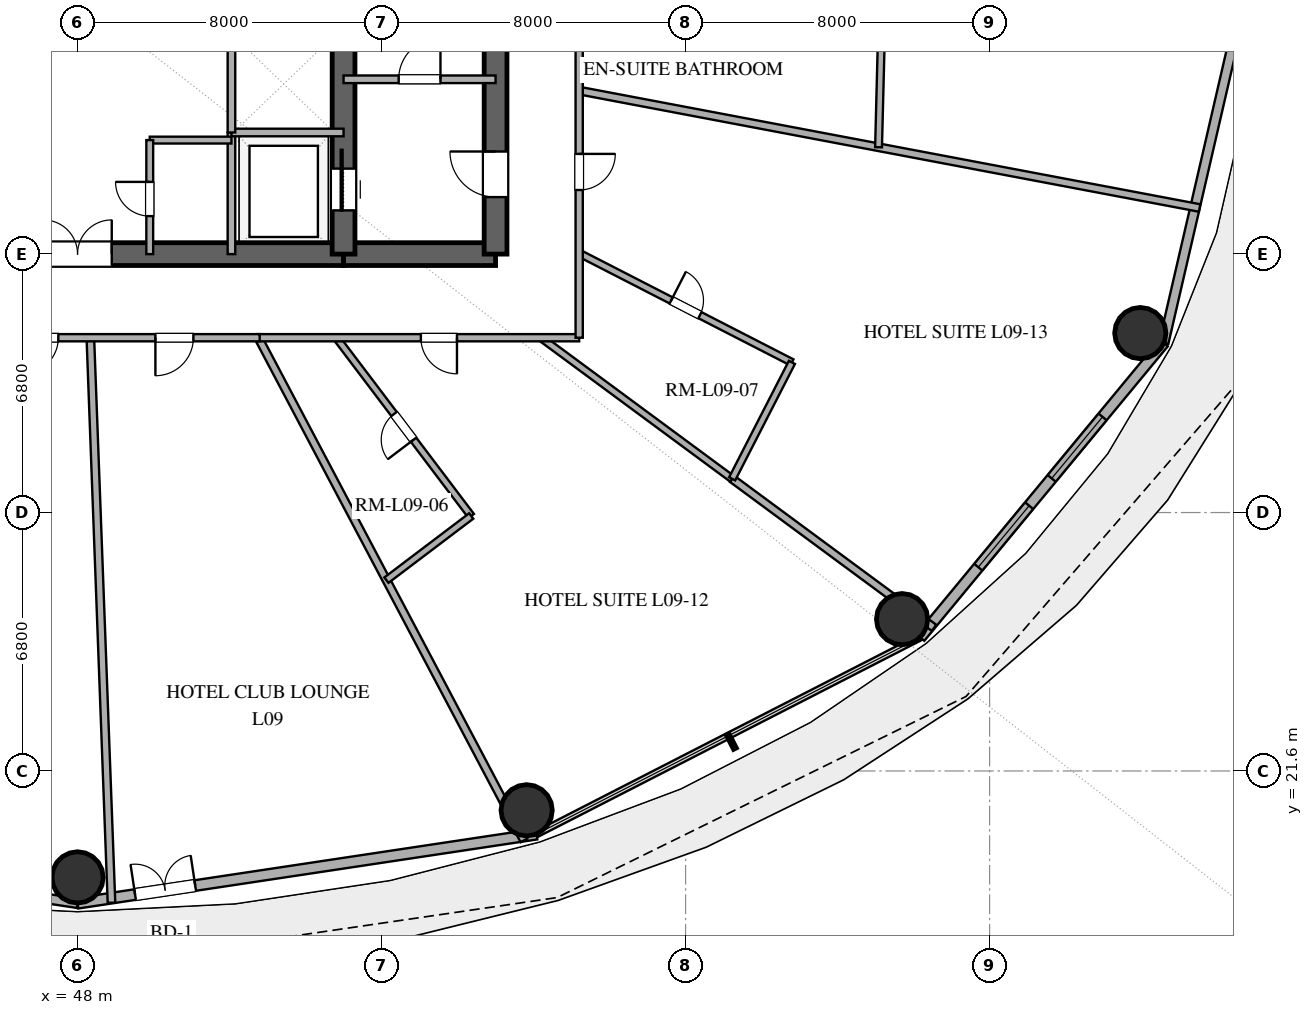
"""IFC4 building model, lengths in metres.
Left out: names, types, materials, properties, quantities, classifications, styles, units other than length and angle.
Written with IfcOpenShell. Run it as: python <this file> out.ifc"""

import sys

from ifc_helpers import new_model, si_unit, direction, frame, frame_2d, origin, origin_2d, place, context, subcontext, project, spatial, rectangle, hollow_circle, extrude, element, fill, save


model = new_model("IFC4")
c1 = context("Model", 3, precision=1e-05, world=origin(), true_north=direction((0.0, 1.0)))
c2 = subcontext(c1, "Body", "Model", "MODEL_VIEW")
j1 = project(units=[si_unit("LENGTHUNIT", "METRE"), si_unit("PLANEANGLEUNIT", "RADIAN")], contexts=[c1])
p1 = place(None, origin())
s1 = spatial("IfcSite", under=j1, at=p1, CompositionType="ELEMENT")
p2 = place(p1, origin())
s2 = spatial("IfcBuilding", under=s1, at=p2, CompositionType="ELEMENT")
p3 = place(p2, frame((0.0, 0.0, 42.6)))
s3 = spatial("IfcBuildingStorey", under=s2, at=p3, CompositionType="ELEMENT", Elevation=42.6)
p4 = place(p3, frame((41.0, 35.2, 0.0), z_axis=(0.0, 0.0, 1.0), x_axis=(1.0, 0.0, 0.0)))
e1 = element("IfcWall", 1, at=p4, inside=s3, PredefinedType="SHEAR", context=c2, shape_type="SweptSolid", body=[
    extrude(rectangle(XDim=14.0, YDim=0.6, at=frame_2d((7.0, 0.0))), origin(), (0.0, 0.0, 1.0), 3.38),
])
p5 = place(p4, frame((6.1, 0.0, 0.0)))
e2 = element("IfcOpeningElement", 2, at=p5, cuts=e1, PredefinedType="OPENING", context=c2, shape_type="SweptSolid", body=[
    extrude(rectangle(XDim=1.8, YDim=2.25, at=frame_2d((0.9, 1.125))), frame((0.0, 0.31, 0.0), z_axis=(0.0, -1.0, 0.0), x_axis=(1.0, 0.0, 0.0)), (0.0, 0.0, 1.0), 0.62),
])
p6 = place(p3, frame((55.0, 35.2, 0.0), z_axis=(0.0, 0.0, 1.0), x_axis=(1.0, 0.0, 0.0)))
e3 = element("IfcWall", 3, at=p6, inside=s3, PredefinedType="SHEAR", context=c2, shape_type="SweptSolid", body=[
    extrude(rectangle(XDim=4.0, YDim=0.6, at=frame_2d((2.0, 0.0))), origin(), (0.0, 0.0, 1.0), 3.38),
])
p7 = place(p3, frame((59.0, 35.2, 0.0), z_axis=(0.0, 0.0, 1.0), x_axis=(0.0, 1.0, 0.0)))
e4 = element("IfcWall", 4, at=p7, inside=s3, PredefinedType="SHEAR", context=c2, shape_type="SweptSolid", body=[
    extrude(rectangle(XDim=13.6, YDim=0.6, at=frame_2d((6.8, 0.0))), origin(), (0.0, 0.0, 1.0), 3.38),
])
p8 = place(p7, frame((1.5, 0.0, 0.0)))
e5 = element("IfcOpeningElement", 5, at=p8, cuts=e4, PredefinedType="OPENING", context=c2, shape_type="SweptSolid", body=[
    extrude(rectangle(XDim=1.2, YDim=2.15, at=frame_2d((0.6, 1.075))), frame((0.0, 0.31, 0.0), z_axis=(0.0, -1.0, 0.0), x_axis=(1.0, 0.0, 0.0)), (0.0, 0.0, 1.0), 0.62),
])
p9 = place(p3, frame((55.0, 35.2, 0.0), z_axis=(0.0, 0.0, 1.0), x_axis=(0.0, 1.0, 0.0)))
e6 = element("IfcWall", 6, at=p9, inside=s3, PredefinedType="SHEAR", context=c2, shape_type="SweptSolid", body=[
    extrude(rectangle(XDim=13.6, YDim=0.6, at=frame_2d((6.8, 0.0))), origin(), (0.0, 0.0, 1.0), 3.38),
])
p10 = place(p9, frame((1.15, 0.0, 0.0)))
e7 = element("IfcOpeningElement", 7, at=p10, cuts=e6, PredefinedType="OPENING", context=c2, shape_type="SweptSolid", body=[
    extrude(rectangle(XDim=1.1, YDim=2.2, at=frame_2d((0.55, 1.1))), frame((0.0, 0.31, 0.0), z_axis=(0.0, -1.0, 0.0), x_axis=(1.0, 0.0, 0.0)), (0.0, 0.0, 1.0), 0.62),
])
for number, where, z_axis, x_axis in (
    (8, (48.0, 18.8, 0.0), (0.0, 0.0, 1.0), (1.0, 0.0, 0.0)),
    (9, (59.818, 20.566, 0.0), (0.0, 0.0, 1.0), (1.0, 0.0, 0.0)),
    (10, (69.697, 25.595, 0.0), (0.0, 0.0, 1.0), (1.0, 0.0, 0.0)),
    (11, (75.966, 33.122, 0.0), (0.0, 0.0, 1.0), (1.0, 0.0, 0.0)),
):
    element("IfcColumn", number, at=place(p3, frame(where, z_axis=z_axis, x_axis=x_axis)), inside=s3, PredefinedType="COLUMN", context=c2, shape_type="SweptSolid", body=[
        extrude(hollow_circle(Radius=0.675, WallThickness=0.036, at=origin_2d()), origin(), (0.0, 0.0, 1.0), 3.38),
    ])
p11 = place(p3, frame((35.922, 19.938, 0.0), z_axis=(0.0, 0.0, 1.0), x_axis=(0.988864835849, -0.148816452121, 0.0)))
e12 = element("IfcWall", 12, at=p11, inside=s3, PredefinedType="SOLIDWALL", context=c2, shape_type="SweptSolid", body=[
    extrude(rectangle(XDim=12.214, YDim=0.25, at=frame_2d((6.107, 0.0))), origin(), (0.0, 0.0, 1.0), 3.38),
])
p12 = place(p11, frame((8.134, 0.0, 1.42)))
e13 = element("IfcOpeningElement", 13, at=p12, cuts=e12, PredefinedType="OPENING", context=c2, shape_type="SweptSolid", body=[
    extrude(rectangle(XDim=1.0, YDim=1.05, at=frame_2d((0.5, 0.525))), frame((0.0, 0.135, 0.0), z_axis=(0.0, -1.0, 0.0), x_axis=(1.0, 0.0, 0.0)), (0.0, 0.0, 1.0), 0.27),
])
p13 = place(p3, frame((48.0, 18.12, 0.0), z_axis=(0.0, 0.0, 1.0), x_axis=(0.988864835849, 0.148816452121, 0.0)))
e14 = element("IfcWall", 14, at=p13, inside=s3, PredefinedType="SOLIDWALL", context=c2, shape_type="SweptSolid", body=[
    extrude(rectangle(XDim=12.214, YDim=0.28, at=frame_2d((6.107, 0.0))), origin(), (0.0, 0.0, 1.0), 3.38),
])
p14 = place(p13, frame((1.531, 0.0, 0.0)))
e15 = element("IfcOpeningElement", 15, at=p14, cuts=e14, PredefinedType="OPENING", context=c2, shape_type="SweptSolid", body=[
    extrude(rectangle(XDim=1.6, YDim=2.25, at=frame_2d((0.8, 1.125))), frame((0.0, 0.15, 0.0), z_axis=(0.0, -1.0, 0.0), x_axis=(1.0, 0.0, 0.0)), (0.0, 0.0, 1.0), 0.3),
])
p15 = place(p3, frame((70.174, 25.114, 0.0), z_axis=(0.0, 0.0, 1.0), x_axis=(0.637296809613, 0.770618437657, 0.0)))
e16 = element("IfcWall", 16, at=p15, inside=s3, PredefinedType="SOLIDWALL", context=c2, shape_type="SweptSolid", body=[
    extrude(rectangle(XDim=10.053, YDim=0.28, at=frame_2d((5.027, 0.0))), origin(), (0.0, 0.0, 1.0), 3.38),
])
p16 = place(p15, frame((2.398, 0.0, 0.85)))
e17 = element("IfcOpeningElement", 17, at=p16, cuts=e16, PredefinedType="OPENING", context=c2, shape_type="SweptSolid", body=[
    extrude(rectangle(XDim=2.1, YDim=2.2, at=frame_2d((1.05, 1.1))), frame((0.0, 0.15, 0.0), z_axis=(0.0, -1.0, 0.0), x_axis=(1.0, 0.0, 0.0)), (0.0, 0.0, 1.0), 0.3),
])
p17 = place(p15, frame((5.43, 0.0, 0.85)))
e18 = element("IfcOpeningElement", 18, at=p17, cuts=e16, PredefinedType="OPENING", context=c2, shape_type="SweptSolid", body=[
    extrude(rectangle(XDim=2.1, YDim=2.2, at=frame_2d((1.05, 1.1))), frame((0.0, 0.15, 0.0), z_axis=(0.0, -1.0, 0.0), x_axis=(1.0, 0.0, 0.0)), (0.0, 0.0, 1.0), 0.3),
])
p18 = place(p3, frame((76.581, 32.862, 0.0), z_axis=(0.0, 0.0, 1.0), x_axis=(0.225454452941, 0.974253709076, 0.0)))
e19 = element("IfcWall", 19, at=p18, inside=s3, PredefinedType="SOLIDWALL", context=c2, shape_type="SweptSolid", body=[
    extrude(rectangle(XDim=9.38, YDim=0.25, at=frame_2d((4.69, 0.0))), origin(), (0.0, 0.0, 1.0), 3.38),
])
p19 = place(p3, frame((55.0, 39.8, 0.0), z_axis=(0.0, 0.0, 1.0), x_axis=(1.0, 0.0, 0.0)))
e20 = element("IfcWall", 20, at=p19, inside=s3, PredefinedType="SOLIDWALL", context=c2, shape_type="SweptSolid", body=[
    extrude(rectangle(XDim=4.0, YDim=0.2, at=frame_2d((2.0, 0.0))), origin(), (0.0, 0.0, 1.0), 2.74),
])
p20 = place(p19, frame((1.45, 0.0, 0.0)))
e21 = element("IfcOpeningElement", 21, at=p20, cuts=e20, PredefinedType="OPENING", context=c2, shape_type="SweptSolid", body=[
    extrude(rectangle(XDim=1.1, YDim=2.15, at=frame_2d((0.55, 1.075))), frame((0.0, 0.11, 0.0), z_axis=(0.0, -1.0, 0.0), x_axis=(1.0, 0.0, 0.0)), (0.0, 0.0, 1.0), 0.22),
])
p21 = place(p3, frame((52.05, 35.2, 0.0), z_axis=(0.0, 0.0, 1.0), x_axis=(0.0, 1.0, 0.0)))
e22 = element("IfcWall", 22, at=p21, inside=s3, PredefinedType="SOLIDWALL", context=c2, shape_type="SweptSolid", body=[
    extrude(rectangle(XDim=3.2, YDim=0.2, at=frame_2d((1.6, 0.0))), origin(), (0.0, 0.0, 1.0), 2.74),
])
p22 = place(p3, frame((52.05, 38.4, 0.0), z_axis=(0.0, 0.0, 1.0), x_axis=(1.0, 0.0, 0.0)))
e23 = element("IfcWall", 23, at=p22, inside=s3, PredefinedType="SOLIDWALL", context=c2, shape_type="SweptSolid", body=[
    extrude(rectangle(XDim=2.95, YDim=0.2, at=frame_2d((1.475, 0.0))), origin(), (0.0, 0.0, 1.0), 2.74),
])
p23 = place(p3, frame((52.05, 38.4, 0.0), z_axis=(0.0, 0.0, 1.0), x_axis=(0.0, 1.0, 0.0)))
e24 = element("IfcWall", 24, at=p23, inside=s3, PredefinedType="SOLIDWALL", context=c2, shape_type="SweptSolid", body=[
    extrude(rectangle(XDim=10.4, YDim=0.2, at=frame_2d((5.2, 0.0))), origin(), (0.0, 0.0, 1.0), 2.74),
])
p24 = place(p23, frame((8.2, 0.0, 0.0)))
e25 = element("IfcOpeningElement", 25, at=p24, cuts=e24, PredefinedType="OPENING", context=c2, shape_type="SweptSolid", body=[
    extrude(rectangle(XDim=1.2, YDim=2.2, at=frame_2d((0.6, 1.1))), frame((0.0, 0.11, 0.0), z_axis=(0.0, -1.0, 0.0), x_axis=(1.0, 0.0, 0.0)), (0.0, 0.0, 1.0), 0.22),
])
p25 = place(p3, frame((49.9, 38.2, 0.0), z_axis=(0.0, 0.0, 1.0), x_axis=(1.0, 0.0, 0.0)))
e26 = element("IfcWall", 26, at=p25, inside=s3, PredefinedType="PLUMBINGWALL", context=c2, shape_type="SweptSolid", body=[
    extrude(rectangle(XDim=2.15, YDim=0.18, at=frame_2d((1.075, 0.0))), origin(), (0.0, 0.0, 1.0), 2.74),
])
p26 = place(p3, frame((49.9, 35.2, 0.0), z_axis=(0.0, 0.0, 1.0), x_axis=(0.0, 1.0, 0.0)))
e27 = element("IfcWall", 27, at=p26, inside=s3, PredefinedType="PLUMBINGWALL", context=c2, shape_type="SweptSolid", body=[
    extrude(rectangle(XDim=3.0, YDim=0.18, at=frame_2d((1.5, 0.0))), origin(), (0.0, 0.0, 1.0), 2.74),
])
p27 = place(p26, frame((1.0, 0.0, 0.0)))
e28 = element("IfcOpeningElement", 28, at=p27, cuts=e27, PredefinedType="OPENING", context=c2, shape_type="SweptSolid", body=[
    extrude(rectangle(XDim=0.9, YDim=2.1, at=frame_2d((0.45, 1.05))), frame((0.0, 0.1, 0.0), z_axis=(0.0, -1.0, 0.0), x_axis=(1.0, 0.0, 0.0)), (0.0, 0.0, 1.0), 0.2),
])
p28 = place(p3, frame((48.893, 18.134, 0.0), z_axis=(0.0, 0.0, 1.0), x_axis=(-0.037384345878, 0.999300961014, 0.0)))
e29 = element("IfcWall", 29, at=p28, inside=s3, PredefinedType="PARTITIONING", context=c2, shape_type="SweptSolid", body=[
    extrude(rectangle(XDim=14.877, YDim=0.2, at=frame_2d((7.438, 0.0))), origin(), (0.0, 0.0, 1.0), 2.74),
])
p29 = place(p3, frame((61.2, 39.502, 0.0), z_axis=(0.0, 0.0, 1.0), x_axis=(0.982565603173, -0.185916205484, 0.0)))
e30 = element("IfcWall", 30, at=p29, inside=s3, PredefinedType="PARTITIONING", context=c2, shape_type="SweptSolid", body=[
    extrude(rectangle(XDim=16.616, YDim=0.2, at=frame_2d((8.308, 0.0))), origin(), (0.0, 0.0, 1.0), 2.74),
])
p30 = place(p3, frame((52.757, 33.0, 0.0), z_axis=(0.0, 0.0, 1.0), x_axis=(0.467270516294, -0.884114395654, 0.0)))
e31 = element("IfcWall", 31, at=p30, inside=s3, PredefinedType="PARTITIONING", context=c2, shape_type="SweptSolid", body=[
    extrude(rectangle(XDim=14.96, YDim=0.2, at=frame_2d((7.48, 0.0))), origin(), (0.0, 0.0, 1.0), 2.74),
])
p31 = place(p3, frame((70.538, 25.366, 0.0), z_axis=(0.0, 0.0, 1.0), x_axis=(-0.804616980297, 0.593794168898, 0.0)))
e32 = element("IfcWall", 32, at=p31, inside=s3, PredefinedType="PARTITIONING", context=c2, shape_type="SweptSolid", body=[
    extrude(rectangle(XDim=6.603, YDim=0.2, at=frame_2d((3.302, 0.0))), origin(), (0.0, 0.0, 1.0), 2.74),
])
p32 = place(p3, frame((61.2, 35.224, 0.0), z_axis=(0.0, 0.0, 1.0), x_axis=(0.889651376734, -0.456640370395, 0.0)))
e33 = element("IfcWall", 33, at=p32, inside=s3, PredefinedType="PLUMBINGWALL", context=c2, shape_type="SweptSolid", body=[
    extrude(rectangle(XDim=6.292, YDim=0.18, at=frame_2d((3.146, 0.0))), origin(), (0.0, 0.0, 1.0), 2.74),
])
p33 = place(p32, frame((2.721, 0.0, 0.0)))
e34 = element("IfcOpeningElement", 34, at=p33, cuts=e33, PredefinedType="OPENING", context=c2, shape_type="SweptSolid", body=[
    extrude(rectangle(XDim=0.85, YDim=2.1, at=frame_2d((0.425, 1.05))), frame((0.0, 0.1, 0.0), z_axis=(0.0, -1.0, 0.0), x_axis=(1.0, 0.0, 0.0)), (0.0, 0.0, 1.0), 0.2),
])
p34 = place(p3, frame((65.225, 29.287, 0.0), z_axis=(0.0, 0.0, 1.0), x_axis=(-0.804582519588, 0.593840861825, 0.0)))
e35 = element("IfcWall", 35, at=p34, inside=s3, PredefinedType="PLUMBINGWALL", context=c2, shape_type="SweptSolid", body=[
    extrude(rectangle(XDim=6.252, YDim=0.18, at=frame_2d((3.126, 0.0))), origin(), (0.0, 0.0, 1.0), 2.74),
])
p35 = place(p3, frame((58.36, 28.309, 0.0), z_axis=(0.0, 0.0, 1.0), x_axis=(-0.603401299207, 0.797437691682, 0.0)))
e36 = element("IfcWall", 36, at=p35, inside=s3, PredefinedType="PLUMBINGWALL", context=c2, shape_type="SweptSolid", body=[
    extrude(rectangle(XDim=5.882, YDim=0.18, at=frame_2d((2.941, 0.0))), origin(), (0.0, 0.0, 1.0), 2.74),
])
p36 = place(p35, frame((2.516, 0.0, 0.0)))
e37 = element("IfcOpeningElement", 37, at=p36, cuts=e36, PredefinedType="OPENING", context=c2, shape_type="SweptSolid", body=[
    extrude(rectangle(XDim=0.85, YDim=2.1, at=frame_2d((0.425, 1.05))), frame((0.0, 0.1, 0.0), z_axis=(0.0, -1.0, 0.0), x_axis=(1.0, 0.0, 0.0)), (0.0, 0.0, 1.0), 0.2),
])
p37 = place(p3, frame((61.2, 33.0, 0.0), z_axis=(0.0, 0.0, 1.0), x_axis=(-1.0, 0.0, 0.0)))
e38 = element("IfcWall", 38, at=p37, inside=s3, PredefinedType="PARTITIONING", context=c2, shape_type="SweptSolid", body=[
    extrude(rectangle(XDim=8.479, YDim=0.19, at=frame_2d((4.24, 0.0))), origin(), (0.0, 0.0, 1.0), 2.74),
])
p38 = place(p37, frame((3.216, 0.0, 0.0)))
e39 = element("IfcOpeningElement", 39, at=p38, cuts=e38, PredefinedType="OPENING", context=c2, shape_type="SweptSolid", body=[
    extrude(rectangle(XDim=0.95, YDim=2.15, at=frame_2d((0.475, 1.075))), frame((0.0, 0.105, 0.0), z_axis=(0.0, -1.0, 0.0), x_axis=(1.0, 0.0, 0.0)), (0.0, 0.0, 1.0), 0.21),
])
p39 = place(p3, frame((52.793, 33.0, 0.0), z_axis=(0.0, 0.0, 1.0), x_axis=(-1.0, 0.0, 0.0)))
e40 = element("IfcWall", 40, at=p39, inside=s3, PredefinedType="PARTITIONING", context=c2, shape_type="SweptSolid", body=[
    extrude(rectangle(XDim=8.754, YDim=0.19, at=frame_2d((4.377, 0.0))), origin(), (0.0, 0.0, 1.0), 2.74),
])
p40 = place(p39, frame((1.744, 0.0, 0.0)))
e41 = element("IfcOpeningElement", 41, at=p40, cuts=e40, PredefinedType="OPENING", context=c2, shape_type="SweptSolid", body=[
    extrude(rectangle(XDim=1.0, YDim=2.2, at=frame_2d((0.5, 1.1))), frame((0.0, 0.105, 0.0), z_axis=(0.0, -1.0, 0.0), x_axis=(1.0, 0.0, 0.0)), (0.0, 0.0, 1.0), 0.21),
])
p41 = place(p39, frame((5.298, 0.0, 0.0)))
e42 = element("IfcOpeningElement", 42, at=p41, cuts=e40, PredefinedType="OPENING", context=c2, shape_type="SweptSolid", body=[
    extrude(rectangle(XDim=0.95, YDim=2.15, at=frame_2d((0.475, 1.075))), frame((0.0, 0.105, 0.0), z_axis=(0.0, -1.0, 0.0), x_axis=(1.0, 0.0, 0.0)), (0.0, 0.0, 1.0), 0.21),
])
p42 = place(p3, frame((61.2, 41.696, 0.0), z_axis=(0.0, 0.0, 1.0), x_axis=(0.0, -1.0, 0.0)))
e43 = element("IfcWall", 43, at=p42, inside=s3, PredefinedType="PARTITIONING", context=c2, shape_type="SweptSolid", body=[
    extrude(rectangle(XDim=8.696, YDim=0.19, at=frame_2d((4.348, 0.0))), origin(), (0.0, 0.0, 1.0), 2.74),
])
p43 = place(p42, frame((3.86, 0.0, 0.0)))
e44 = element("IfcOpeningElement", 44, at=p43, cuts=e43, PredefinedType="OPENING", context=c2, shape_type="SweptSolid", body=[
    extrude(rectangle(XDim=0.95, YDim=2.15, at=frame_2d((0.475, 1.075))), frame((0.0, 0.105, 0.0), z_axis=(0.0, -1.0, 0.0), x_axis=(1.0, 0.0, 0.0)), (0.0, 0.0, 1.0), 0.21),
])
p44 = place(p3, frame((69.078, 38.012, 0.0), z_axis=(0.0, 0.0, 1.0), x_axis=(0.02539873932, 0.999677399985, 0.0)))
e45 = element("IfcWall", 45, at=p44, inside=s3, PredefinedType="PLUMBINGWALL", context=c2, shape_type="SweptSolid", body=[
    extrude(rectangle(XDim=3.451, YDim=0.18, at=frame_2d((1.726, 0.0))), origin(), (0.0, 0.0, 1.0), 2.74),
])
p45 = place(p3, frame((66.798, 32.351, 0.0), z_axis=(0.0, 0.0, 1.0), x_axis=(-0.456659133546, -0.889641745732, 0.0)))
e46 = element("IfcWall", 46, at=p45, inside=s3, PredefinedType="PLUMBINGWALL", context=c2, shape_type="SweptSolid", body=[
    extrude(rectangle(XDim=3.444, YDim=0.18, at=frame_2d((1.722, 0.0))), origin(), (0.0, 0.0, 1.0), 2.74),
])
p46 = place(p3, frame((56.128, 26.621, 0.0), z_axis=(0.0, 0.0, 1.0), x_axis=(0.797438154909, 0.603400687019, 0.0)))
e47 = element("IfcWall", 47, at=p46, inside=s3, PredefinedType="PLUMBINGWALL", context=c2, shape_type="SweptSolid", body=[
    extrude(rectangle(XDim=2.798, YDim=0.18, at=frame_2d((1.399, 0.0))), origin(), (0.0, 0.0, 1.0), 2.74),
])
p47 = place(p14, origin())
e48 = element("IfcDoor", 48, at=p47, inside=s3, OperationType="DOUBLE_DOOR_SINGLE_SWING", PredefinedType="DOOR", context=c2, shape_type="SweptSolid", body=[
    extrude(rectangle(XDim=1.6, YDim=2.25, at=frame_2d((0.8, 1.125))), frame((0.0, 0.025, 0.0), z_axis=(0.0, -1.0, 0.0), x_axis=(1.0, 0.0, 0.0)), (0.0, 0.0, 1.0), 0.05),
])
fill(e15, e48)
p48 = place(p16, origin())
e49 = element("IfcWindow", 49, at=p48, inside=s3, PartitioningType="SINGLE_PANEL", PredefinedType="WINDOW", context=c2, shape_type="SweptSolid", body=[
    extrude(rectangle(XDim=2.1, YDim=2.2, at=frame_2d((1.05, 1.1))), frame((0.0, 0.03, 0.0), z_axis=(0.0, -1.0, 0.0), x_axis=(1.0, 0.0, 0.0)), (0.0, 0.0, 1.0), 0.06),
])
fill(e17, e49)
p49 = place(p17, origin())
e50 = element("IfcWindow", 50, at=p49, inside=s3, PartitioningType="SINGLE_PANEL", PredefinedType="WINDOW", context=c2, shape_type="SweptSolid", body=[
    extrude(rectangle(XDim=2.1, YDim=2.2, at=frame_2d((1.05, 1.1))), frame((0.0, 0.03, 0.0), z_axis=(0.0, -1.0, 0.0), x_axis=(1.0, 0.0, 0.0)), (0.0, 0.0, 1.0), 0.06),
])
fill(e18, e50)
p50 = place(p10, origin())
e51 = element("IfcDoor", 51, at=p50, inside=s3, OperationType="SLIDING_TO_RIGHT", PredefinedType="DOOR", context=c2, shape_type="SweptSolid", body=[
    extrude(rectangle(XDim=1.1, YDim=2.2, at=frame_2d((0.55, 1.1))), frame((0.0, 0.025, 0.0), z_axis=(0.0, -1.0, 0.0), x_axis=(1.0, 0.0, 0.0)), (0.0, 0.0, 1.0), 0.05),
])
fill(e7, e51)
p51 = place(p8, origin())
e52 = element("IfcDoor", 52, at=p51, inside=s3, OperationType="SINGLE_SWING_RIGHT", PredefinedType="DOOR", context=c2, shape_type="SweptSolid", body=[
    extrude(rectangle(XDim=1.2, YDim=2.15, at=frame_2d((0.6, 1.075))), frame((0.0, 0.025, 0.0), z_axis=(0.0, -1.0, 0.0), x_axis=(1.0, 0.0, 0.0)), (0.0, 0.0, 1.0), 0.05),
])
fill(e5, e52)
p52 = place(p5, origin())
e53 = element("IfcDoor", 53, at=p52, inside=s3, OperationType="DOUBLE_DOOR_SINGLE_SWING", PredefinedType="DOOR", context=c2, shape_type="SweptSolid", body=[
    extrude(rectangle(XDim=1.8, YDim=2.25, at=frame_2d((0.9, 1.125))), frame((0.0, 0.025, 0.0), z_axis=(0.0, -1.0, 0.0), x_axis=(1.0, 0.0, 0.0)), (0.0, 0.0, 1.0), 0.05),
])
fill(e2, e53)
p53 = place(p20, origin())
e54 = element("IfcDoor", 54, at=p53, inside=s3, OperationType="SINGLE_SWING_RIGHT", PredefinedType="DOOR", context=c2, shape_type="SweptSolid", body=[
    extrude(rectangle(XDim=1.1, YDim=2.15, at=frame_2d((0.55, 1.075))), frame((0.0, 0.025, 0.0), z_axis=(0.0, -1.0, 0.0), x_axis=(1.0, 0.0, 0.0)), (0.0, 0.0, 1.0), 0.05),
])
fill(e21, e54)
p54 = place(p27, origin())
e55 = element("IfcDoor", 55, at=p54, inside=s3, OperationType="SINGLE_SWING_RIGHT", PredefinedType="DOOR", context=c2, shape_type="SweptSolid", body=[
    extrude(rectangle(XDim=0.9, YDim=2.1, at=frame_2d((0.45, 1.05))), frame((0.0, 0.025, 0.0), z_axis=(0.0, -1.0, 0.0), x_axis=(1.0, 0.0, 0.0)), (0.0, 0.0, 1.0), 0.05),
])
fill(e28, e55)
p55 = place(p33, origin())
e56 = element("IfcDoor", 56, at=p55, inside=s3, OperationType="SINGLE_SWING_LEFT", PredefinedType="DOOR", context=c2, shape_type="SweptSolid", body=[
    extrude(rectangle(XDim=0.85, YDim=2.1, at=frame_2d((0.425, 1.05))), frame((0.0, 0.025, 0.0), z_axis=(0.0, -1.0, 0.0), x_axis=(1.0, 0.0, 0.0)), (0.0, 0.0, 1.0), 0.05),
])
fill(e34, e56)
p56 = place(p36, origin())
e57 = element("IfcDoor", 57, at=p56, inside=s3, OperationType="SINGLE_SWING_LEFT", PredefinedType="DOOR", context=c2, shape_type="SweptSolid", body=[
    extrude(rectangle(XDim=0.85, YDim=2.1, at=frame_2d((0.425, 1.05))), frame((0.0, 0.025, 0.0), z_axis=(0.0, -1.0, 0.0), x_axis=(1.0, 0.0, 0.0)), (0.0, 0.0, 1.0), 0.05),
])
fill(e37, e57)
p57 = place(p38, origin())
e58 = element("IfcDoor", 58, at=p57, inside=s3, OperationType="SINGLE_SWING_LEFT", PredefinedType="DOOR", context=c2, shape_type="SweptSolid", body=[
    extrude(rectangle(XDim=0.95, YDim=2.15, at=frame_2d((0.475, 1.075))), frame((0.0, 0.025, 0.0), z_axis=(0.0, -1.0, 0.0), x_axis=(1.0, 0.0, 0.0)), (0.0, 0.0, 1.0), 0.05),
])
fill(e39, e58)
p58 = place(p40, origin())
e59 = element("IfcDoor", 59, at=p58, inside=s3, OperationType="SINGLE_SWING_RIGHT", PredefinedType="DOOR", context=c2, shape_type="SweptSolid", body=[
    extrude(rectangle(XDim=1.0, YDim=2.2, at=frame_2d((0.5, 1.1))), frame((0.0, 0.025, 0.0), z_axis=(0.0, -1.0, 0.0), x_axis=(1.0, 0.0, 0.0)), (0.0, 0.0, 1.0), 0.05),
])
fill(e41, e59)
p59 = place(p41, origin())
e60 = element("IfcDoor", 60, at=p59, inside=s3, OperationType="SINGLE_SWING_RIGHT", PredefinedType="DOOR", context=c2, shape_type="SweptSolid", body=[
    extrude(rectangle(XDim=0.95, YDim=2.15, at=frame_2d((0.475, 1.075))), frame((0.0, 0.025, 0.0), z_axis=(0.0, -1.0, 0.0), x_axis=(1.0, 0.0, 0.0)), (0.0, 0.0, 1.0), 0.05),
])
fill(e42, e60)
p60 = place(p43, origin())
e61 = element("IfcDoor", 61, at=p60, inside=s3, OperationType="SINGLE_SWING_LEFT", PredefinedType="DOOR", context=c2, shape_type="SweptSolid", body=[
    extrude(rectangle(XDim=0.95, YDim=2.15, at=frame_2d((0.475, 1.075))), frame((0.0, 0.025, 0.0), z_axis=(0.0, -1.0, 0.0), x_axis=(1.0, 0.0, 0.0)), (0.0, 0.0, 1.0), 0.05),
])
fill(e44, e61)
save(model, sys.argv[1])
